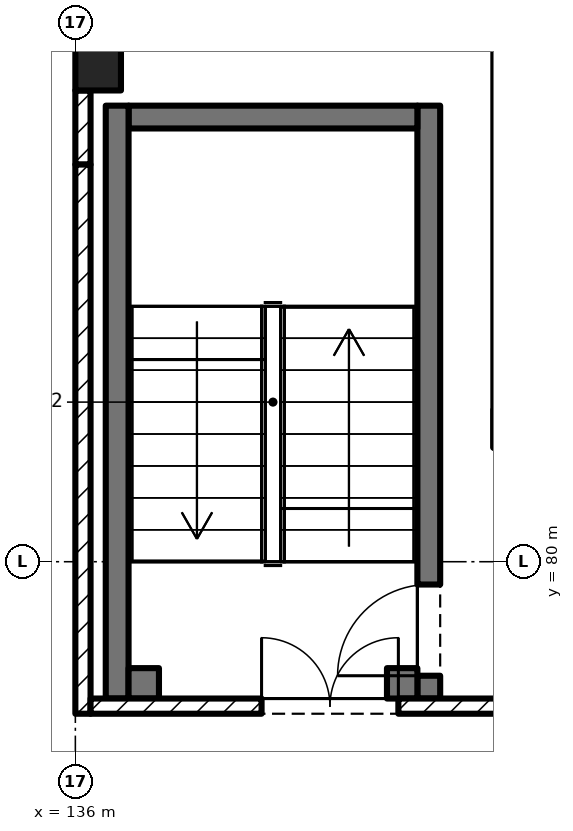
"""IFC4 building model, lengths in metres.
Left out: names, types, materials, properties, quantities, classifications, styles, units other than length and angle.
Written with IfcOpenShell. Run it as: python <this file> out.ifc"""

import sys

from ifc_helpers import new_model, si_unit, direction, frame, frame_2d, origin, origin_2d, place, context, subcontext, project, spatial, rectangle, extrude, element, fill, save


model = new_model("IFC4")
c1 = context("Model", 3, precision=1e-05, world=origin(), true_north=direction((0.0, 1.0)))
c2 = subcontext(c1, "Body", "Model", "MODEL_VIEW")
j1 = project(units=[si_unit("LENGTHUNIT", "METRE"), si_unit("PLANEANGLEUNIT", "RADIAN")], contexts=[c1])
p1 = place(None, origin())
s1 = spatial("IfcSite", under=j1, at=p1, CompositionType="ELEMENT")
p2 = place(p1, origin())
s2 = spatial("IfcBuilding", under=s1, at=p2, CompositionType="ELEMENT")
p3 = place(p2, origin())
s3 = spatial("IfcBuildingStorey", under=s2, at=p3, CompositionType="ELEMENT", Elevation=0.0)
p4 = place(p3, frame((136.3, 86.5, 0.0), z_axis=(0.0, 0.0, 1.0), x_axis=(1.0, 0.0, 0.0)))
e1 = element("IfcColumn", 1, at=p4, inside=s3, PredefinedType="COLUMN", context=c2, shape_type="SweptSolid", body=[
    extrude(rectangle(XDim=0.6, YDim=0.6, at=origin_2d()), origin(), (0.0, 0.0, 1.0), 6.0),
])
p5 = place(p3, frame((136.1, 86.2, 0.0), z_axis=(0.0, 0.0, 1.0), x_axis=(0.0, -1.0, 0.0)))
e2 = element("IfcWall", 2, at=p5, inside=s3, PredefinedType="SOLIDWALL", context=c2, shape_type="SweptSolid", body=[
    extrude(rectangle(XDim=0.975, YDim=0.2, at=frame_2d((0.487, 0.0))), origin(), (0.0, 0.0, 1.0), 5.05),
])
p6 = place(p3, frame((136.1, 85.225, 0.0), z_axis=(0.0, 0.0, 1.0), x_axis=(0.0, -1.0, 0.0)))
e3 = element("IfcWall", 3, at=p6, inside=s3, PredefinedType="SOLIDWALL", context=c2, shape_type="SweptSolid", body=[
    extrude(rectangle(XDim=7.225, YDim=0.2, at=frame_2d((3.613, 0.0))), origin(), (0.0, 0.0, 1.0), 5.05),
])
p7 = place(p3, frame((136.2, 78.1, 0.0), z_axis=(0.0, 0.0, 1.0), x_axis=(1.0, 0.0, 0.0)))
e4 = element("IfcWall", 4, at=p7, inside=s3, PredefinedType="SOLIDWALL", context=c2, shape_type="SweptSolid", body=[
    extrude(rectangle(XDim=7.7, YDim=0.2, at=frame_2d((3.85, 0.0))), origin(), (0.0, 0.0, 1.0), 5.05),
])
p8 = place(p7, frame((2.25, 0.0, 0.0)))
e5 = element("IfcOpeningElement", 5, at=p8, cuts=e4, PredefinedType="OPENING", context=c2, shape_type="SweptSolid", body=[
    extrude(rectangle(XDim=1.8, YDim=2.4, at=frame_2d((0.9, 1.2))), frame((0.0, 0.112, 0.0), z_axis=(0.0, -1.0, 0.0), x_axis=(1.0, 0.0, 0.0)), (0.0, 0.0, 1.0), 0.224),
])
p9 = place(p3, frame((140.65, 78.2, 0.0), z_axis=(0.0, 0.0, 1.0), x_axis=(0.0, 1.0, 0.0)))
e6 = element("IfcWall", 6, at=p9, inside=s3, PredefinedType="SOLIDWALL", context=c2, shape_type="SweptSolid", body=[
    extrude(rectangle(XDim=7.8, YDim=0.3, at=frame_2d((3.9, 0.0))), origin(), (0.0, 0.0, 1.0), 6.0),
])
p10 = place(p9, frame((0.3, 0.0, 0.0)))
e7 = element("IfcOpeningElement", 7, at=p10, cuts=e6, PredefinedType="OPENING", context=c2, shape_type="SweptSolid", body=[
    extrude(rectangle(XDim=1.2, YDim=2.1, at=frame_2d((0.6, 1.05))), frame((0.0, 0.162, 0.0), z_axis=(0.0, -1.0, 0.0), x_axis=(1.0, 0.0, 0.0)), (0.0, 0.0, 1.0), 0.324),
])
p11 = place(p3, frame((140.5, 85.85, 0.0), z_axis=(0.0, 0.0, 1.0), x_axis=(-1.0, 0.0, 0.0)))
e8 = element("IfcWall", 8, at=p11, inside=s3, PredefinedType="SOLIDWALL", context=c2, shape_type="SweptSolid", body=[
    extrude(rectangle(XDim=3.8, YDim=0.3, at=frame_2d((1.9, 0.0))), origin(), (0.0, 0.0, 1.0), 6.0),
])
p12 = place(p3, frame((136.55, 86.0, 0.0), z_axis=(0.0, 0.0, 1.0), x_axis=(0.0, -1.0, 0.0)))
e9 = element("IfcWall", 9, at=p12, inside=s3, PredefinedType="SOLIDWALL", context=c2, shape_type="SweptSolid", body=[
    extrude(rectangle(XDim=7.8, YDim=0.3, at=frame_2d((3.9, 0.0))), origin(), (0.0, 0.0, 1.0), 6.0),
])
p13 = place(p3, frame((136.7, 78.4, 0.0), z_axis=(0.0, 0.0, 1.0), x_axis=(1.0, 0.0, 0.0)))
e10 = element("IfcWall", 10, at=p13, inside=s3, PredefinedType="SOLIDWALL", context=c2, shape_type="SweptSolid", body=[
    extrude(rectangle(XDim=0.4, YDim=0.4, at=frame_2d((0.2, 0.0))), origin(), (0.0, 0.0, 1.0), 6.0),
])
p14 = place(p3, frame((140.1, 78.4, 0.0), z_axis=(0.0, 0.0, 1.0), x_axis=(1.0, 0.0, 0.0)))
e11 = element("IfcWall", 11, at=p14, inside=s3, PredefinedType="SOLIDWALL", context=c2, shape_type="SweptSolid", body=[
    extrude(rectangle(XDim=0.4, YDim=0.4, at=frame_2d((0.2, 0.0))), origin(), (0.0, 0.0, 1.0), 6.0),
])
p15 = place(p10, origin())
e12 = element("IfcDoor", 12, at=p15, inside=s3, OperationType="SINGLE_SWING_LEFT", PredefinedType="DOOR", context=c2, shape_type="SweptSolid", body=[
    extrude(rectangle(XDim=1.2, YDim=2.1, at=frame_2d((0.6, 1.05))), frame((0.0, 0.025, 0.0), z_axis=(0.0, -1.0, 0.0), x_axis=(1.0, 0.0, 0.0)), (0.0, 0.0, 1.0), 0.05),
])
fill(e7, e12)
p16 = place(p8, origin())
e13 = element("IfcDoor", 13, at=p16, inside=s3, OperationType="DOUBLE_DOOR_DOUBLE_SWING", PredefinedType="DOOR", context=c2, shape_type="SweptSolid", body=[
    extrude(rectangle(XDim=1.8, YDim=2.4, at=frame_2d((0.9, 1.2))), frame((0.0, 0.025, 0.0), z_axis=(0.0, -1.0, 0.0), x_axis=(1.0, 0.0, 0.0)), (0.0, 0.0, 1.0), 0.05),
])
fill(e5, e13)
save(model, sys.argv[1])
